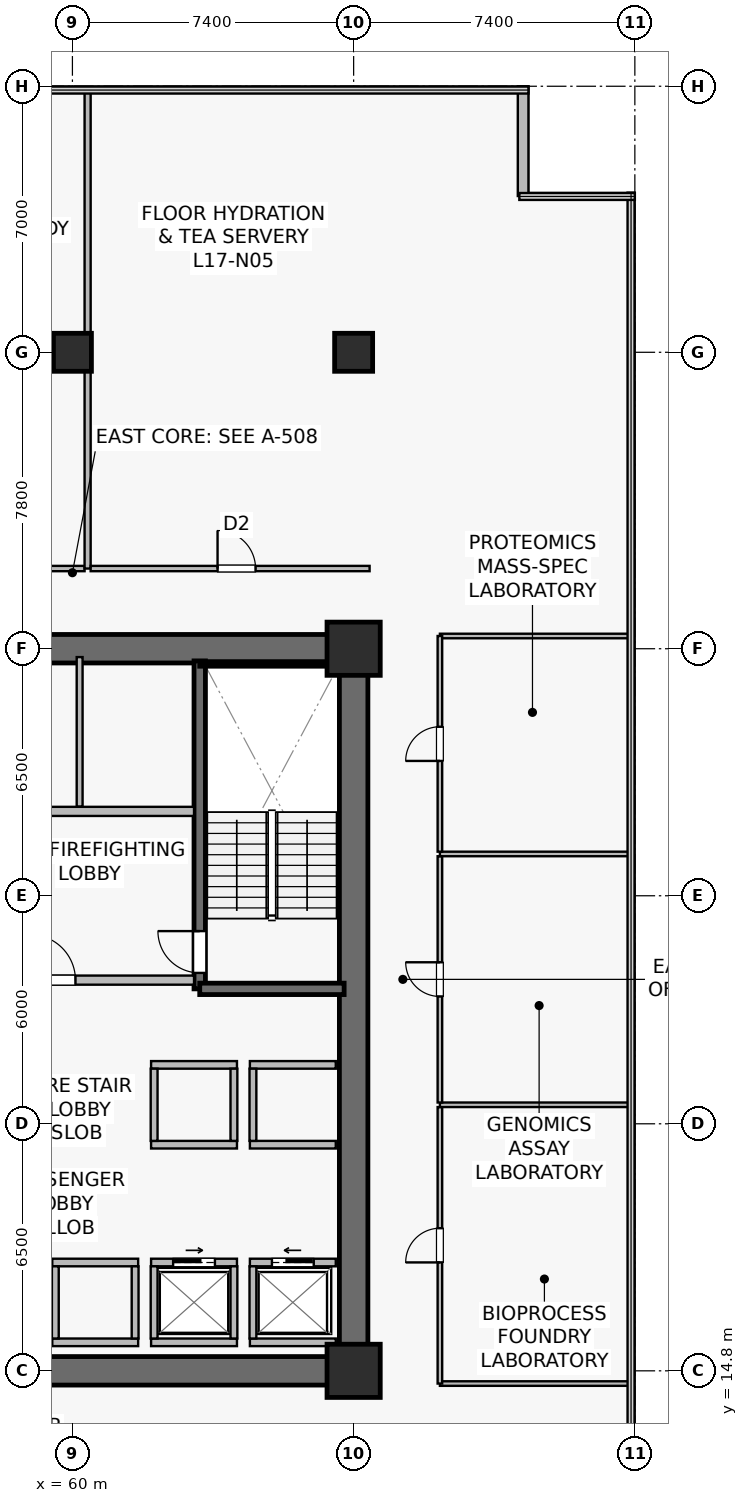
"""IFC4 building model, lengths in metres.
Left out: names, types, materials, properties, quantities, classifications, styles, units other than length and angle.
Written with IfcOpenShell. Run it as: python <this file> out.ifc"""

import sys

from ifc_helpers import new_model, si_unit, direction, frame, frame_2d, origin, origin_2d, place, context, subcontext, project, spatial, rectangle, extrude, source, transform, mapped, element, fill, save


model = new_model("IFC4")
c1 = context("Model", 3, precision=1e-05, world=origin(), true_north=direction((0.0, 1.0)))
c2 = subcontext(c1, "Body", "Model", "MODEL_VIEW")
j1 = project(units=[si_unit("LENGTHUNIT", "METRE"), si_unit("PLANEANGLEUNIT", "RADIAN")], contexts=[c1])
p1 = place(None, origin())
s1 = spatial("IfcSite", under=j1, at=p1, CompositionType="ELEMENT")
p2 = place(p1, origin())
s2 = spatial("IfcBuilding", under=s1, at=p2, CompositionType="ELEMENT")
p3 = place(p2, frame((0.0, 0.0, 70.3)))
s3 = spatial("IfcBuildingStorey", under=s2, at=p3, CompositionType="ELEMENT", Elevation=70.3)
p4 = place(p3, frame((52.225, 14.8, 0.0), z_axis=(0.0, 0.0, 1.0), x_axis=(1.0, 0.0, 0.0)))
e1 = element("IfcWall", 1, at=p4, inside=s3, PredefinedType="SHEAR", context=c2, shape_type="SweptSolid", body=[
    extrude(rectangle(XDim=15.55, YDim=0.75, at=frame_2d((7.775, 0.0))), origin(), (0.0, 0.0, 1.0), 3.78),
])
p5 = place(p3, frame((52.225, 33.8, 0.0), z_axis=(0.0, 0.0, 1.0), x_axis=(1.0, 0.0, 0.0)))
e2 = element("IfcWall", 2, at=p5, inside=s3, PredefinedType="SHEAR", context=c2, shape_type="SweptSolid", body=[
    extrude(rectangle(XDim=15.55, YDim=0.75, at=frame_2d((7.775, 0.0))), origin(), (0.0, 0.0, 1.0), 3.78),
])
p6 = place(p5, frame((6.175, 0.0, 0.0)))
e3 = element("IfcOpeningElement", 3, at=p6, cuts=e2, PredefinedType="OPENING", context=c2, shape_type="SweptSolid", body=[
    extrude(rectangle(XDim=0.95, YDim=2.15, at=frame_2d((0.475, 1.075))), frame((0.0, 0.385, 0.0), z_axis=(0.0, -1.0, 0.0), x_axis=(1.0, 0.0, 0.0)), (0.0, 0.0, 1.0), 0.77),
])
p7 = place(p5, frame((2.635, 0.0, 0.0)))
e4 = element("IfcOpeningElement", 4, at=p7, cuts=e2, PredefinedType="OPENING", context=c2, shape_type="SweptSolid", body=[
    extrude(rectangle(XDim=0.95, YDim=2.15, at=frame_2d((0.475, 1.075))), frame((0.0, 0.385, 0.0), z_axis=(0.0, -1.0, 0.0), x_axis=(1.0, 0.0, 0.0)), (0.0, 0.0, 1.0), 0.77),
])
p8 = place(p3, frame((67.4, 15.175, 0.0), z_axis=(0.0, 0.0, 1.0), x_axis=(0.0, 1.0, 0.0)))
e5 = element("IfcWall", 5, at=p8, inside=s3, PredefinedType="SHEAR", context=c2, shape_type="SweptSolid", body=[
    extrude(rectangle(XDim=18.25, YDim=0.75, at=frame_2d((9.125, 0.0))), origin(), (0.0, 0.0, 1.0), 3.78),
])
p9 = place(p3, frame((63.35, 24.85, 0.0), z_axis=(0.0, 0.0, 1.0), x_axis=(0.0, 1.0, 0.0)))
e6 = element("IfcWall", 6, at=p9, inside=s3, PredefinedType="SHEAR", context=c2, shape_type="SweptSolid", body=[
    extrude(rectangle(XDim=8.63, YDim=0.3, at=frame_2d((4.315, 0.0))), origin(), (0.0, 0.0, 1.0), 3.78),
])
p10 = place(p9, frame((0.42, 0.0, 0.0)))
e7 = element("IfcOpeningElement", 7, at=p10, cuts=e6, PredefinedType="OPENING", context=c2, shape_type="SweptSolid", body=[
    extrude(rectangle(XDim=1.1, YDim=2.15, at=frame_2d((0.55, 1.075))), frame((0.0, 0.16, 0.0), z_axis=(0.0, -1.0, 0.0), x_axis=(1.0, 0.0, 0.0)), (0.0, 0.0, 1.0), 0.32),
])
p11 = place(p3, frame((63.35, 24.85, 0.0), z_axis=(0.0, 0.0, 1.0), x_axis=(1.0, 0.0, 0.0)))
e8 = element("IfcWall", 8, at=p11, inside=s3, PredefinedType="SHEAR", context=c2, shape_type="SweptSolid", body=[
    extrude(rectangle(XDim=3.8, YDim=0.3, at=frame_2d((1.9, 0.0))), origin(), (0.0, 0.0, 1.0), 3.78),
])
p12 = place(p3, frame((63.35, 33.4, 0.0), z_axis=(0.0, 0.0, 1.0), x_axis=(1.0, 0.0, 0.0)))
e9 = element("IfcWall", 9, at=p12, inside=s3, PredefinedType="SOLIDWALL", context=c2, shape_type="SweptSolid", body=[
    extrude(rectangle(XDim=3.72, YDim=0.12, at=frame_2d((1.86, 0.0))), origin(), (0.0, 0.0, 1.0), 3.78),
])
m1 = source(origin(), c2, "Body", "SweptSolid", [
    extrude(rectangle(XDim=1.4, YDim=1.4, at=origin_2d()), origin(), (0.0, 0.0, 1.0), 4.1),
])
for number, where, z_axis, x_axis in (
    (10, (67.4, 14.8, 0.0), (0.0, 0.0, 1.0), (1.0, 0.0, 0.0)),
    (11, (67.4, 33.8, 0.0), (0.0, 0.0, 1.0), (1.0, 0.0, 0.0)),
):
    element("IfcColumn", number, at=place(p3, frame(where, z_axis=z_axis, x_axis=x_axis)), inside=s3, PredefinedType="COLUMN", context=c2, shape_type="MappedRepresentation", body=[
        mapped(m1, transform((0.0, 0.0, 0.0), scale=1.0)),
    ])
m2 = source(origin(), c2, "Body", "SweptSolid", [
    extrude(rectangle(XDim=1.0, YDim=1.0, at=origin_2d()), origin(), (0.0, 0.0, 1.0), 4.1),
])
for number, where, z_axis, x_axis in (
    (12, (60.0, 41.6, 0.0), (0.0, 0.0, 1.0), (1.0, 0.0, 0.0)),
    (13, (67.4, 41.6, 0.0), (0.0, 0.0, 1.0), (1.0, 0.0, 0.0)),
):
    element("IfcColumn", number, at=place(p3, frame(where, z_axis=z_axis, x_axis=x_axis)), inside=s3, PredefinedType="COLUMN", context=c2, shape_type="MappedRepresentation", body=[
        mapped(m2, transform((0.0, 0.0, 0.0), scale=1.0)),
    ])
p13 = place(p3, frame((71.86, 45.712, 0.0), z_axis=(0.0, 0.0, 1.0), x_axis=(0.0, 1.0, 0.0)))
e14 = element("IfcWall", 14, at=p13, inside=s3, PredefinedType="STANDARD", context=c2, shape_type="SweptSolid", body=[
    extrude(rectangle(XDim=2.888, YDim=0.28, at=frame_2d((1.444, 0.0))), origin(), (0.0, 0.0, 1.0), 3.78),
])
p14 = place(p3, frame((56.28, 25.08, 0.0), z_axis=(0.0, 0.0, 1.0), x_axis=(1.0, 0.0, 0.0)))
e15 = element("IfcWall", 15, at=p14, inside=s3, PredefinedType="SOLIDWALL", context=c2, shape_type="SweptSolid", body=[
    extrude(rectangle(XDim=6.92, YDim=0.24, at=frame_2d((3.46, 0.0))), origin(), (0.0, 0.0, 1.0), 3.115),
])
p15 = place(p14, frame((2.6, 0.0, 0.0)))
e16 = element("IfcOpeningElement", 16, at=p15, cuts=e15, PredefinedType="OPENING", context=c2, shape_type="SweptSolid", body=[
    extrude(rectangle(XDim=1.2, YDim=2.16, at=frame_2d((0.6, 1.08))), frame((0.0, 0.13, 0.0), z_axis=(0.0, -1.0, 0.0), x_axis=(1.0, 0.0, 0.0)), (0.0, 0.0, 1.0), 0.26),
])
p16 = place(p3, frame((56.28, 29.52, 0.0), z_axis=(0.0, 0.0, 1.0), x_axis=(1.0, 0.0, 0.0)))
e17 = element("IfcWall", 17, at=p16, inside=s3, PredefinedType="SOLIDWALL", context=c2, shape_type="SweptSolid", body=[
    extrude(rectangle(XDim=6.92, YDim=0.24, at=frame_2d((3.46, 0.0))), origin(), (0.0, 0.0, 1.0), 3.115),
])
p17 = place(p3, frame((64.67, 17.65, 0.0), z_axis=(0.0, 0.0, 1.0), x_axis=(1.0, 0.0, 0.0)))
e18 = element("IfcWall", 18, at=p17, inside=s3, PredefinedType="SOLIDWALL", context=c2, shape_type="SweptSolid", body=[
    extrude(rectangle(XDim=2.26, YDim=0.2, at=frame_2d((1.13, 0.0))), origin(), (0.0, 0.0, 1.0), 3.78),
])
p18 = place(p17, frame((0.58, 0.0, 0.0)))
e19 = element("IfcOpeningElement", 19, at=p18, cuts=e18, PredefinedType="OPENING", context=c2, shape_type="SweptSolid", body=[
    extrude(rectangle(XDim=1.1, YDim=2.22, at=frame_2d((0.55, 1.11))), frame((0.0, 0.11, 0.0), z_axis=(0.0, -1.0, 0.0), x_axis=(1.0, 0.0, 0.0)), (0.0, 0.0, 1.0), 0.22),
])
p19 = place(p3, frame((64.67, 15.55, 0.0), z_axis=(0.0, 0.0, 1.0), x_axis=(1.0, 0.0, 0.0)))
e20 = element("IfcWall", 20, at=p19, inside=s3, PredefinedType="SOLIDWALL", context=c2, shape_type="SweptSolid", body=[
    extrude(rectangle(XDim=2.26, YDim=0.2, at=frame_2d((1.13, 0.0))), origin(), (0.0, 0.0, 1.0), 3.78),
])
p20 = place(p3, frame((64.75, 15.65, 0.0), z_axis=(0.0, 0.0, 1.0), x_axis=(0.0, 1.0, 0.0)))
e21 = element("IfcWall", 21, at=p20, inside=s3, PredefinedType="SOLIDWALL", context=c2, shape_type="SweptSolid", body=[
    extrude(rectangle(XDim=1.9, YDim=0.18, at=frame_2d((0.95, 0.0))), origin(), (0.0, 0.0, 1.0), 3.78),
])
p21 = place(p3, frame((62.07, 17.65, 0.0), z_axis=(0.0, 0.0, 1.0), x_axis=(1.0, 0.0, 0.0)))
e22 = element("IfcWall", 22, at=p21, inside=s3, PredefinedType="SOLIDWALL", context=c2, shape_type="SweptSolid", body=[
    extrude(rectangle(XDim=2.26, YDim=0.2, at=frame_2d((1.13, 0.0))), origin(), (0.0, 0.0, 1.0), 3.78),
])
p22 = place(p21, frame((0.58, 0.0, 0.0)))
e23 = element("IfcOpeningElement", 23, at=p22, cuts=e22, PredefinedType="OPENING", context=c2, shape_type="SweptSolid", body=[
    extrude(rectangle(XDim=1.1, YDim=2.22, at=frame_2d((0.55, 1.11))), frame((0.0, 0.11, 0.0), z_axis=(0.0, -1.0, 0.0), x_axis=(1.0, 0.0, 0.0)), (0.0, 0.0, 1.0), 0.22),
])
p23 = place(p3, frame((62.07, 15.55, 0.0), z_axis=(0.0, 0.0, 1.0), x_axis=(1.0, 0.0, 0.0)))
e24 = element("IfcWall", 24, at=p23, inside=s3, PredefinedType="SOLIDWALL", context=c2, shape_type="SweptSolid", body=[
    extrude(rectangle(XDim=2.26, YDim=0.2, at=frame_2d((1.13, 0.0))), origin(), (0.0, 0.0, 1.0), 3.78),
])
for number, where, z_axis, x_axis in (
    (25, (62.15, 15.65, 0.0), (0.0, 0.0, 1.0), (0.0, 1.0, 0.0)),
    (26, (64.25, 15.65, 0.0), (0.0, 0.0, 1.0), (0.0, 1.0, 0.0)),
):
    element("IfcWall", number, at=place(p3, frame(where, z_axis=z_axis, x_axis=x_axis)), inside=s3, PredefinedType="SOLIDWALL", context=c2, shape_type="SweptSolid", body=[
        extrude(rectangle(XDim=1.9, YDim=0.18, at=frame_2d((0.95, 0.0))), origin(), (0.0, 0.0, 1.0), 3.78),
    ])
for number, where, z_axis, x_axis in (
    (27, (59.47, 17.65, 0.0), (0.0, 0.0, 1.0), (1.0, 0.0, 0.0)),
    (28, (59.47, 15.55, 0.0), (0.0, 0.0, 1.0), (1.0, 0.0, 0.0)),
):
    element("IfcWall", number, at=place(p3, frame(where, z_axis=z_axis, x_axis=x_axis)), inside=s3, PredefinedType="SOLIDWALL", context=c2, shape_type="SweptSolid", body=[
        extrude(rectangle(XDim=2.26, YDim=0.2, at=frame_2d((1.13, 0.0))), origin(), (0.0, 0.0, 1.0), 3.115),
    ])
for number, where, z_axis, x_axis in (
    (29, (59.55, 15.65, 0.0), (0.0, 0.0, 1.0), (0.0, 1.0, 0.0)),
    (30, (61.65, 15.65, 0.0), (0.0, 0.0, 1.0), (0.0, 1.0, 0.0)),
):
    element("IfcWall", number, at=place(p3, frame(where, z_axis=z_axis, x_axis=x_axis)), inside=s3, PredefinedType="SOLIDWALL", context=c2, shape_type="SweptSolid", body=[
        extrude(rectangle(XDim=1.9, YDim=0.18, at=frame_2d((0.95, 0.0))), origin(), (0.0, 0.0, 1.0), 3.78),
    ])
for number, where, z_axis, x_axis in (
    (31, (64.67, 20.75, 0.0), (0.0, 0.0, 1.0), (1.0, 0.0, 0.0)),
    (32, (64.67, 22.85, 0.0), (0.0, 0.0, 1.0), (1.0, 0.0, 0.0)),
):
    element("IfcWall", number, at=place(p3, frame(where, z_axis=z_axis, x_axis=x_axis)), inside=s3, PredefinedType="SOLIDWALL", context=c2, shape_type="SweptSolid", body=[
        extrude(rectangle(XDim=2.26, YDim=0.2, at=frame_2d((1.13, 0.0))), origin(), (0.0, 0.0, 1.0), 3.78),
    ])
p24 = place(p3, frame((64.75, 20.85, 0.0), z_axis=(0.0, 0.0, 1.0), x_axis=(0.0, 1.0, 0.0)))
e33 = element("IfcWall", 33, at=p24, inside=s3, PredefinedType="SOLIDWALL", context=c2, shape_type="SweptSolid", body=[
    extrude(rectangle(XDim=1.9, YDim=0.18, at=frame_2d((0.95, 0.0))), origin(), (0.0, 0.0, 1.0), 3.78),
])
for number, where, z_axis, x_axis in (
    (34, (62.07, 20.75, 0.0), (0.0, 0.0, 1.0), (1.0, 0.0, 0.0)),
    (35, (62.07, 22.85, 0.0), (0.0, 0.0, 1.0), (1.0, 0.0, 0.0)),
):
    element("IfcWall", number, at=place(p3, frame(where, z_axis=z_axis, x_axis=x_axis)), inside=s3, PredefinedType="SOLIDWALL", context=c2, shape_type="SweptSolid", body=[
        extrude(rectangle(XDim=2.26, YDim=0.2, at=frame_2d((1.13, 0.0))), origin(), (0.0, 0.0, 1.0), 3.78),
    ])
for number, where, z_axis, x_axis in (
    (36, (62.15, 20.85, 0.0), (0.0, 0.0, 1.0), (0.0, 1.0, 0.0)),
    (37, (64.25, 20.85, 0.0), (0.0, 0.0, 1.0), (0.0, 1.0, 0.0)),
):
    element("IfcWall", number, at=place(p3, frame(where, z_axis=z_axis, x_axis=x_axis)), inside=s3, PredefinedType="SOLIDWALL", context=c2, shape_type="SweptSolid", body=[
        extrude(rectangle(XDim=1.9, YDim=0.18, at=frame_2d((0.95, 0.0))), origin(), (0.0, 0.0, 1.0), 3.78),
    ])
p25 = place(p3, frame((60.19, 29.65, 0.0), z_axis=(0.0, 0.0, 1.0), x_axis=(0.0, 1.0, 0.0)))
e38 = element("IfcWall", 38, at=p25, inside=s3, PredefinedType="PLUMBINGWALL", context=c2, shape_type="SweptSolid", body=[
    extrude(rectangle(XDim=3.93, YDim=0.155, at=frame_2d((1.965, 0.0))), origin(), (0.0, 0.0, 1.0), 3.115),
])
p26 = place(p3, frame((45.08, 35.91, 0.0), z_axis=(0.0, 0.0, 1.0), x_axis=(1.0, 0.0, 0.0)))
e39 = element("IfcWall", 39, at=p26, inside=s3, PredefinedType="PARTITIONING", context=c2, shape_type="SweptSolid", body=[
    extrude(rectangle(XDim=15.24, YDim=0.14, at=frame_2d((7.62, 0.0))), origin(), (0.0, 0.0, 1.0), 3.115),
])
p27 = place(p26, frame((5.86, 0.0, 0.0)))
e40 = element("IfcOpeningElement", 40, at=p27, cuts=e39, PredefinedType="OPENING", context=c2, shape_type="SweptSolid", body=[
    extrude(rectangle(XDim=1.1, YDim=2.18, at=frame_2d((0.55, 1.09))), frame((0.0, 0.08, 0.0), z_axis=(0.0, -1.0, 0.0), x_axis=(1.0, 0.0, 0.0)), (0.0, 0.0, 1.0), 0.16),
])
p28 = place(p3, frame((60.4, 35.91, 0.0), z_axis=(0.0, 0.0, 1.0), x_axis=(0.0, 1.0, 0.0)))
e41 = element("IfcWall", 41, at=p28, inside=s3, PredefinedType="PARTITIONING", context=c2, shape_type="SweptSolid", body=[
    extrude(rectangle(XDim=12.58, YDim=0.16, at=frame_2d((6.29, 0.0))), origin(), (0.0, 0.0, 1.0), 3.015),
])
p29 = place(p3, frame((60.48, 35.91, 0.0), z_axis=(0.0, 0.0, 1.0), x_axis=(1.0, 0.0, 0.0)))
e42 = element("IfcWall", 42, at=p29, inside=s3, PredefinedType="PARTITIONING", context=c2, shape_type="SweptSolid", body=[
    extrude(rectangle(XDim=7.34, YDim=0.14, at=frame_2d((3.67, 0.0))), origin(), (0.0, 0.0, 1.0), 3.265),
])
p30 = place(p29, frame((3.339, 0.0, 0.0)))
e43 = element("IfcOpeningElement", 43, at=p30, cuts=e42, PredefinedType="OPENING", context=c2, shape_type="SweptSolid", body=[
    extrude(rectangle(XDim=1.0, YDim=2.15, at=frame_2d((0.5, 1.075))), frame((0.0, 0.08, 0.0), z_axis=(0.0, -1.0, 0.0), x_axis=(1.0, 0.0, 0.0)), (0.0, 0.0, 1.0), 0.16),
])
for number, where, z_axis, x_axis in (
    (44, (69.67, 14.465, 0.0), (0.0, 0.0, 1.0), (1.0, 0.0, 0.0)),
    (45, (69.67, 34.135, 0.0), (0.0, 0.0, 1.0), (1.0, 0.0, 0.0)),
):
    element("IfcWall", number, at=place(p3, frame(where, z_axis=z_axis, x_axis=x_axis)), inside=s3, PredefinedType="PARTITIONING", context=c2, shape_type="SweptSolid", body=[
        extrude(rectangle(XDim=5.02, YDim=0.12, at=frame_2d((2.51, 0.0))), origin(), (0.0, 0.0, 1.0), 3.78),
    ])
p31 = place(p3, frame((69.67, 14.465, 0.0), z_axis=(0.0, 0.0, 1.0), x_axis=(0.0, 1.0, 0.0)))
e46 = element("IfcWall", 46, at=p31, inside=s3, PredefinedType="PARTITIONING", context=c2, shape_type="SweptSolid", body=[
    extrude(rectangle(XDim=7.275, YDim=0.12, at=frame_2d((3.637, 0.0))), origin(), (0.0, 0.0, 1.0), 3.78),
])
p32 = place(p31, frame((3.188, 0.0, 0.0)))
e47 = element("IfcOpeningElement", 47, at=p32, cuts=e46, PredefinedType="OPENING", context=c2, shape_type="SweptSolid", body=[
    extrude(rectangle(XDim=0.9, YDim=2.1, at=frame_2d((0.45, 1.05))), frame((0.0, 0.07, 0.0), z_axis=(0.0, -1.0, 0.0), x_axis=(1.0, 0.0, 0.0)), (0.0, 0.0, 1.0), 0.14),
])
p33 = place(p3, frame((69.67, 21.8, 0.0), z_axis=(0.0, 0.0, 1.0), x_axis=(1.0, 0.0, 0.0)))
e48 = element("IfcWall", 48, at=p33, inside=s3, PredefinedType="PARTITIONING", context=c2, shape_type="SweptSolid", body=[
    extrude(rectangle(XDim=5.02, YDim=0.12, at=frame_2d((2.51, 0.0))), origin(), (0.0, 0.0, 1.0), 3.78),
])
p34 = place(p3, frame((69.67, 21.86, 0.0), z_axis=(0.0, 0.0, 1.0), x_axis=(0.0, 1.0, 0.0)))
e49 = element("IfcWall", 49, at=p34, inside=s3, PredefinedType="PARTITIONING", context=c2, shape_type="SweptSolid", body=[
    extrude(rectangle(XDim=6.48, YDim=0.12, at=frame_2d((3.24, 0.0))), origin(), (0.0, 0.0, 1.0), 3.78),
])
p35 = place(p34, frame((2.79, 0.0, 0.0)))
e50 = element("IfcOpeningElement", 50, at=p35, cuts=e49, PredefinedType="OPENING", context=c2, shape_type="SweptSolid", body=[
    extrude(rectangle(XDim=0.9, YDim=2.1, at=frame_2d((0.45, 1.05))), frame((0.0, 0.07, 0.0), z_axis=(0.0, -1.0, 0.0), x_axis=(1.0, 0.0, 0.0)), (0.0, 0.0, 1.0), 0.14),
])
p36 = place(p3, frame((69.67, 28.4, 0.0), z_axis=(0.0, 0.0, 1.0), x_axis=(1.0, 0.0, 0.0)))
e51 = element("IfcWall", 51, at=p36, inside=s3, PredefinedType="PARTITIONING", context=c2, shape_type="SweptSolid", body=[
    extrude(rectangle(XDim=5.02, YDim=0.12, at=frame_2d((2.51, 0.0))), origin(), (0.0, 0.0, 1.0), 3.78),
])
p37 = place(p3, frame((69.67, 28.46, 0.0), z_axis=(0.0, 0.0, 1.0), x_axis=(0.0, 1.0, 0.0)))
e52 = element("IfcWall", 52, at=p37, inside=s3, PredefinedType="PARTITIONING", context=c2, shape_type="SweptSolid", body=[
    extrude(rectangle(XDim=5.675, YDim=0.12, at=frame_2d((2.837, 0.0))), origin(), (0.0, 0.0, 1.0), 3.78),
])
p38 = place(p37, frame((2.387, 0.0, 0.0)))
e53 = element("IfcOpeningElement", 53, at=p38, cuts=e52, PredefinedType="OPENING", context=c2, shape_type="SweptSolid", body=[
    extrude(rectangle(XDim=0.9, YDim=2.1, at=frame_2d((0.45, 1.05))), frame((0.0, 0.07, 0.0), z_axis=(0.0, -1.0, 0.0), x_axis=(1.0, 0.0, 0.0)), (0.0, 0.0, 1.0), 0.14),
])
m3 = source(origin(), c2, "Body", "SweptSolid", [
    extrude(rectangle(XDim=1.1, YDim=2.15, at=frame_2d((0.55, 1.075))), frame((0.0, 0.025, 0.0), z_axis=(0.0, -1.0, 0.0), x_axis=(1.0, 0.0, 0.0)), (0.0, 0.0, 1.0), 0.05),
])
p39 = place(p10, origin())
e54 = element("IfcDoor", 54, at=p39, inside=s3, OperationType="SINGLE_SWING_RIGHT", PredefinedType="DOOR", context=c2, shape_type="MappedRepresentation", body=[
    mapped(m3, transform((0.0, 0.0, 0.0), scale=1.0)),
])
fill(e7, e54)
m4 = source(origin(), c2, "Body", "SweptSolid", [
    extrude(rectangle(XDim=1.2, YDim=2.16, at=frame_2d((0.6, 1.08))), frame((0.0, 0.025, 0.0), z_axis=(0.0, -1.0, 0.0), x_axis=(1.0, 0.0, 0.0)), (0.0, 0.0, 1.0), 0.05),
])
p40 = place(p15, origin())
e55 = element("IfcDoor", 55, at=p40, inside=s3, OperationType="SINGLE_SWING_LEFT", PredefinedType="DOOR", context=c2, shape_type="MappedRepresentation", body=[
    mapped(m4, transform((0.0, 0.0, 0.0), scale=1.0)),
])
fill(e16, e55)
m5 = source(origin(), c2, "Body", "SweptSolid", [
    extrude(rectangle(XDim=1.1, YDim=2.22, at=frame_2d((0.55, 1.11))), frame((0.0, 0.025, 0.0), z_axis=(0.0, -1.0, 0.0), x_axis=(1.0, 0.0, 0.0)), (0.0, 0.0, 1.0), 0.05),
])
p41 = place(p18, origin())
e56 = element("IfcDoor", 56, at=p41, inside=s3, OperationType="SLIDING_TO_LEFT", PredefinedType="USERDEFINED", context=c2, shape_type="MappedRepresentation", body=[
    mapped(m5, transform((0.0, 0.0, 0.0), scale=1.0)),
])
fill(e19, e56)
p42 = place(p22, origin())
e57 = element("IfcDoor", 57, at=p42, inside=s3, OperationType="SLIDING_TO_RIGHT", PredefinedType="USERDEFINED", context=c2, shape_type="MappedRepresentation", body=[
    mapped(m5, transform((0.0, 0.0, 0.0), scale=1.0)),
])
fill(e23, e57)
m6 = source(origin(), c2, "Body", "SweptSolid", [
    extrude(rectangle(XDim=1.0, YDim=2.15, at=frame_2d((0.5, 1.075))), frame((0.0, 0.025, 0.0), z_axis=(0.0, -1.0, 0.0), x_axis=(1.0, 0.0, 0.0)), (0.0, 0.0, 1.0), 0.05),
])
p43 = place(p30, origin())
e58 = element("IfcDoor", 58, at=p43, inside=s3, OperationType="SINGLE_SWING_LEFT", PredefinedType="DOOR", context=c2, shape_type="MappedRepresentation", body=[
    mapped(m6, transform((0.0, 0.0, 0.0), scale=1.0)),
])
fill(e43, e58)
m7 = source(origin(), c2, "Body", "SweptSolid", [
    extrude(rectangle(XDim=0.9, YDim=2.1, at=frame_2d((0.45, 1.05))), frame((0.0, 0.025, 0.0), z_axis=(0.0, -1.0, 0.0), x_axis=(1.0, 0.0, 0.0)), (0.0, 0.0, 1.0), 0.05),
])
p44 = place(p32, origin())
e59 = element("IfcDoor", 59, at=p44, inside=s3, OperationType="SINGLE_SWING_LEFT", PredefinedType="DOOR", context=c2, shape_type="MappedRepresentation", body=[
    mapped(m7, transform((0.0, 0.0, 0.0), scale=1.0)),
])
fill(e47, e59)
p45 = place(p35, origin())
e60 = element("IfcDoor", 60, at=p45, inside=s3, OperationType="SINGLE_SWING_RIGHT", PredefinedType="DOOR", context=c2, shape_type="MappedRepresentation", body=[
    mapped(m7, transform((0.0, 0.0, 0.0), scale=1.0)),
])
fill(e50, e60)
p46 = place(p38, origin())
e61 = element("IfcDoor", 61, at=p46, inside=s3, OperationType="SINGLE_SWING_LEFT", PredefinedType="DOOR", context=c2, shape_type="MappedRepresentation", body=[
    mapped(m7, transform((0.0, 0.0, 0.0), scale=1.0)),
])
fill(e53, e61)
save(model, sys.argv[1])
